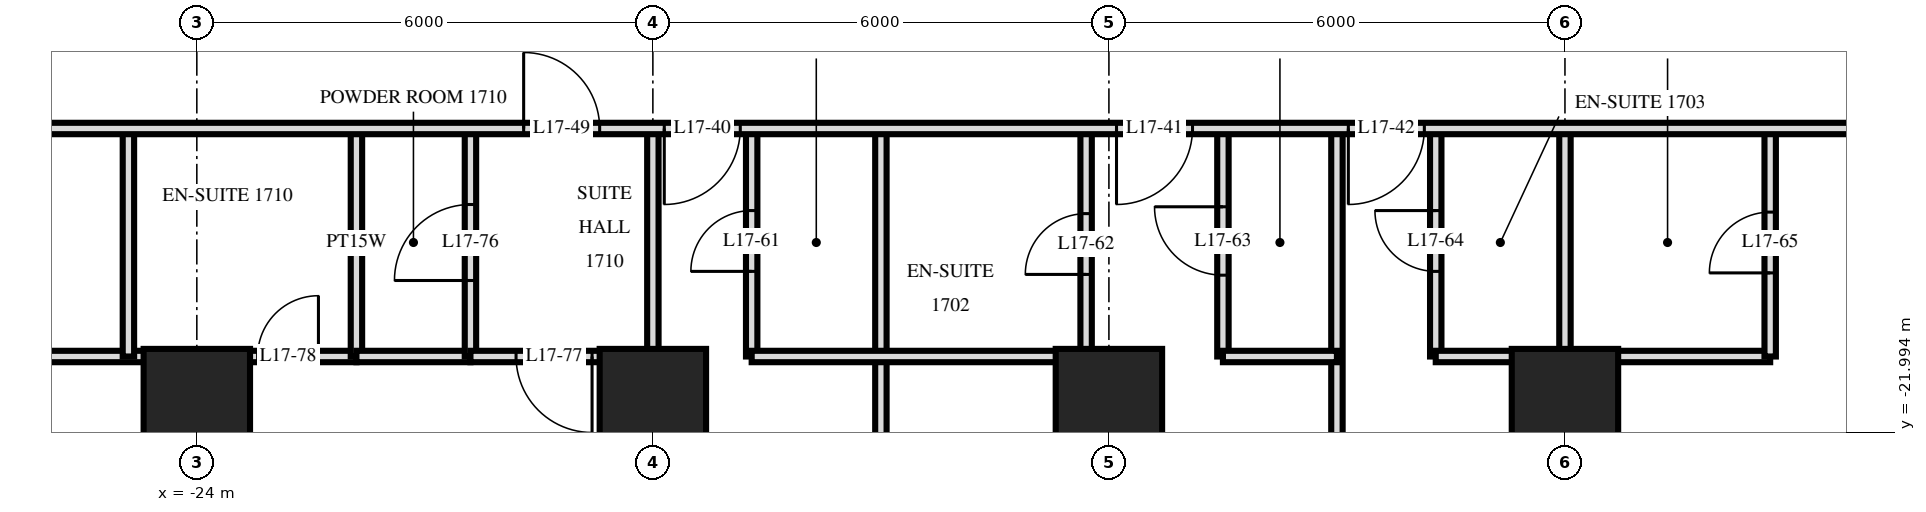
"""IFC4 building model, lengths in metres.
Left out: names, types, materials, properties, quantities, classifications, styles, units other than length and angle.
Written with IfcOpenShell. Run it as: python <this file> out.ifc"""

import sys

from ifc_helpers import new_model, si_unit, direction, frame, frame_2d, origin, origin_2d, place, context, subcontext, project, spatial, rectangle, extrude, element, fill, save


model = new_model("IFC4")
c1 = context("Model", 3, precision=1e-05, world=origin(), true_north=direction((0.0, 1.0)))
c2 = subcontext(c1, "Body", "Model", "MODEL_VIEW")
j1 = project(units=[si_unit("LENGTHUNIT", "METRE"), si_unit("PLANEANGLEUNIT", "RADIAN")], contexts=[c1])
p1 = place(None, origin())
s1 = spatial("IfcSite", under=j1, at=p1, CompositionType="ELEMENT")
p2 = place(p1, origin())
s2 = spatial("IfcBuilding", under=s1, at=p2, CompositionType="ELEMENT")
p3 = place(p2, frame((0.0, 0.0, 70.8)))
s3 = spatial("IfcBuildingStorey", under=s2, at=p3, CompositionType="ELEMENT", Elevation=70.8)
for number, where, z_axis, x_axis in (
    (1, (-24.0, -21.6, 0.0), (0.0, 0.0, 1.0), (1.0, 0.0, 0.0)),
    (2, (-18.0, -21.6, 0.0), (0.0, 0.0, 1.0), (1.0, 0.0, 0.0)),
    (3, (-12.0, -21.6, 0.0), (0.0, 0.0, 1.0), (1.0, 0.0, 0.0)),
    (4, (-6.0, -21.6, 0.0), (0.0, 0.0, 1.0), (1.0, 0.0, 0.0)),
):
    element("IfcColumn", number, at=place(p3, frame(where, z_axis=z_axis, x_axis=x_axis)), inside=s3, PredefinedType="COLUMN", context=c2, shape_type="SweptSolid", body=[
        extrude(rectangle(XDim=1.4, YDim=1.4, at=origin_2d()), origin(), (0.0, 0.0, 1.0), 3.6),
    ])
p4 = place(p3, frame((-3.3, -21.0, 0.0), z_axis=(0.0, 0.0, 1.0), x_axis=(0.0, 1.0, 0.0)))
e5 = element("IfcWall", 5, at=p4, inside=s3, PredefinedType="PARTITIONING", context=c2, shape_type="SweptSolid", body=[
    extrude(rectangle(XDim=3.0, YDim=0.15, at=frame_2d((1.5, 0.0))), origin(), (0.0, 0.0, 1.0), 3.32),
])
p5 = place(p4, frame((1.1, 0.0, 0.0)))
e6 = element("IfcOpeningElement", 6, at=p5, cuts=e5, PredefinedType="OPENING", context=c2, shape_type="SweptSolid", body=[
    extrude(rectangle(XDim=0.8, YDim=2.1, at=frame_2d((0.4, 1.05))), frame((0.0, 0.085, 0.0), z_axis=(0.0, -1.0, 0.0), x_axis=(1.0, 0.0, 0.0)), (0.0, 0.0, 1.0), 0.17),
])
p6 = place(p3, frame((-6.0, -29.22, 0.0), z_axis=(0.0, 0.0, 1.0), x_axis=(0.0, 1.0, 0.0)))
e7 = element("IfcWall", 7, at=p6, inside=s3, PredefinedType="PARTITIONING", context=c2, shape_type="SweptSolid", body=[
    extrude(rectangle(XDim=11.22, YDim=0.15, at=frame_2d((5.61, 0.0))), origin(), (0.0, 0.0, 1.0), 3.32),
])
p7 = place(p3, frame((-7.7, -21.0, 0.0), z_axis=(0.0, 0.0, 1.0), x_axis=(0.0, 1.0, 0.0)))
e8 = element("IfcWall", 8, at=p7, inside=s3, PredefinedType="PARTITIONING", context=c2, shape_type="SweptSolid", body=[
    extrude(rectangle(XDim=3.0, YDim=0.15, at=frame_2d((1.5, 0.0))), origin(), (0.0, 0.0, 1.0), 3.32),
])
p8 = place(p7, frame((1.12, 0.0, 0.0)))
e9 = element("IfcOpeningElement", 9, at=p8, cuts=e8, PredefinedType="OPENING", context=c2, shape_type="SweptSolid", body=[
    extrude(rectangle(XDim=0.8, YDim=2.1, at=frame_2d((0.4, 1.05))), frame((0.0, 0.085, 0.0), z_axis=(0.0, -1.0, 0.0), x_axis=(1.0, 0.0, 0.0)), (0.0, 0.0, 1.0), 0.17),
])
p9 = place(p3, frame((-9.0, -29.22, 0.0), z_axis=(0.0, 0.0, 1.0), x_axis=(0.0, 1.0, 0.0)))
e10 = element("IfcWall", 10, at=p9, inside=s3, PredefinedType="PARTITIONING", context=c2, shape_type="SweptSolid", body=[
    extrude(rectangle(XDim=11.22, YDim=0.15, at=frame_2d((5.61, 0.0))), origin(), (0.0, 0.0, 1.0), 3.32),
])
p10 = place(p3, frame((-10.5, -21.0, 0.0), z_axis=(0.0, 0.0, 1.0), x_axis=(0.0, 1.0, 0.0)))
e11 = element("IfcWall", 11, at=p10, inside=s3, PredefinedType="PARTITIONING", context=c2, shape_type="SweptSolid", body=[
    extrude(rectangle(XDim=3.0, YDim=0.15, at=frame_2d((1.5, 0.0))), origin(), (0.0, 0.0, 1.0), 3.32),
])
p11 = place(p10, frame((1.07, 0.0, 0.0)))
e12 = element("IfcOpeningElement", 12, at=p11, cuts=e11, PredefinedType="OPENING", context=c2, shape_type="SweptSolid", body=[
    extrude(rectangle(XDim=0.9, YDim=2.1, at=frame_2d((0.45, 1.05))), frame((0.0, 0.085, 0.0), z_axis=(0.0, -1.0, 0.0), x_axis=(1.0, 0.0, 0.0)), (0.0, 0.0, 1.0), 0.17),
])
p12 = place(p3, frame((-12.3, -21.0, 0.0), z_axis=(0.0, 0.0, 1.0), x_axis=(0.0, 1.0, 0.0)))
e13 = element("IfcWall", 13, at=p12, inside=s3, PredefinedType="PARTITIONING", context=c2, shape_type="SweptSolid", body=[
    extrude(rectangle(XDim=3.0, YDim=0.15, at=frame_2d((1.5, 0.0))), origin(), (0.0, 0.0, 1.0), 3.32),
])
p13 = place(p12, frame((1.08, 0.0, 0.0)))
e14 = element("IfcOpeningElement", 14, at=p13, cuts=e13, PredefinedType="OPENING", context=c2, shape_type="SweptSolid", body=[
    extrude(rectangle(XDim=0.8, YDim=2.1, at=frame_2d((0.4, 1.05))), frame((0.0, 0.085, 0.0), z_axis=(0.0, -1.0, 0.0), x_axis=(1.0, 0.0, 0.0)), (0.0, 0.0, 1.0), 0.17),
])
p14 = place(p3, frame((-15.0, -29.22, 0.0), z_axis=(0.0, 0.0, 1.0), x_axis=(0.0, 1.0, 0.0)))
e15 = element("IfcWall", 15, at=p14, inside=s3, PredefinedType="PARTITIONING", context=c2, shape_type="SweptSolid", body=[
    extrude(rectangle(XDim=11.22, YDim=0.15, at=frame_2d((5.61, 0.0))), origin(), (0.0, 0.0, 1.0), 3.32),
])
p15 = place(p3, frame((-16.7, -21.0, 0.0), z_axis=(0.0, 0.0, 1.0), x_axis=(0.0, 1.0, 0.0)))
e16 = element("IfcWall", 16, at=p15, inside=s3, PredefinedType="PARTITIONING", context=c2, shape_type="SweptSolid", body=[
    extrude(rectangle(XDim=3.0, YDim=0.15, at=frame_2d((1.5, 0.0))), origin(), (0.0, 0.0, 1.0), 3.32),
])
p16 = place(p15, frame((1.12, 0.0, 0.0)))
e17 = element("IfcOpeningElement", 17, at=p16, cuts=e16, PredefinedType="OPENING", context=c2, shape_type="SweptSolid", body=[
    extrude(rectangle(XDim=0.8, YDim=2.1, at=frame_2d((0.4, 1.05))), frame((0.0, 0.085, 0.0), z_axis=(0.0, -1.0, 0.0), x_axis=(1.0, 0.0, 0.0)), (0.0, 0.0, 1.0), 0.17),
])
p17 = place(p3, frame((-18.0, -21.0, 0.0), z_axis=(0.0, 0.0, 1.0), x_axis=(0.0, 1.0, 0.0)))
e18 = element("IfcWall", 18, at=p17, inside=s3, PredefinedType="PARTITIONING", context=c2, shape_type="SweptSolid", body=[
    extrude(rectangle(XDim=3.0, YDim=0.15, at=frame_2d((1.5, 0.0))), origin(), (0.0, 0.0, 1.0), 3.32),
])
p18 = place(p3, frame((-18.0, -29.22, 0.0), z_axis=(0.0, 0.0, 1.0), x_axis=(0.0, 1.0, 0.0)))
e19 = element("IfcWall", 19, at=p18, inside=s3, PredefinedType="PARTITIONING", context=c2, shape_type="SweptSolid", body=[
    extrude(rectangle(XDim=8.22, YDim=0.15, at=frame_2d((4.11, 0.0))), origin(), (0.0, 0.0, 1.0), 3.32),
])
p19 = place(p3, frame((-20.4, -21.0, 0.0), z_axis=(0.0, 0.0, 1.0), x_axis=(0.0, 1.0, 0.0)))
e20 = element("IfcWall", 20, at=p19, inside=s3, PredefinedType="PARTITIONING", context=c2, shape_type="SweptSolid", body=[
    extrude(rectangle(XDim=3.0, YDim=0.15, at=frame_2d((1.5, 0.0))), origin(), (0.0, 0.0, 1.0), 3.32),
])
p20 = place(p19, frame((1.0, 0.0, 0.0)))
e21 = element("IfcOpeningElement", 21, at=p20, cuts=e20, PredefinedType="OPENING", context=c2, shape_type="SweptSolid", body=[
    extrude(rectangle(XDim=1.0, YDim=2.1, at=frame_2d((0.5, 1.05))), frame((0.0, 0.085, 0.0), z_axis=(0.0, -1.0, 0.0), x_axis=(1.0, 0.0, 0.0)), (0.0, 0.0, 1.0), 0.17),
])
p21 = place(p3, frame((-21.9, -21.0, 0.0), z_axis=(0.0, 0.0, 1.0), x_axis=(0.0, 1.0, 0.0)))
e22 = element("IfcWall", 22, at=p21, inside=s3, PredefinedType="PLUMBINGWALL", context=c2, shape_type="SweptSolid", body=[
    extrude(rectangle(XDim=3.0, YDim=0.15, at=frame_2d((1.5, 0.0))), origin(), (0.0, 0.0, 1.0), 3.32),
])
p22 = place(p3, frame((-24.0, -29.22, 0.0), z_axis=(0.0, 0.0, 1.0), x_axis=(0.0, 1.0, 0.0)))
e23 = element("IfcWall", 23, at=p22, inside=s3, PredefinedType="PARTITIONING", context=c2, shape_type="SweptSolid", body=[
    extrude(rectangle(XDim=8.22, YDim=0.15, at=frame_2d((4.11, 0.0))), origin(), (0.0, 0.0, 1.0), 3.32),
])
p23 = place(p22, frame((3.59, 0.0, 0.0)))
e24 = element("IfcOpeningElement", 24, at=p23, cuts=e23, PredefinedType="OPENING", context=c2, shape_type="SweptSolid", body=[
    extrude(rectangle(XDim=0.9, YDim=2.1, at=frame_2d((0.45, 1.05))), frame((0.0, 0.085, 0.0), z_axis=(0.0, -1.0, 0.0), x_axis=(1.0, 0.0, 0.0)), (0.0, 0.0, 1.0), 0.17),
])
p24 = place(p3, frame((-24.9, -21.0, 0.0), z_axis=(0.0, 0.0, 1.0), x_axis=(0.0, 1.0, 0.0)))
e25 = element("IfcWall", 25, at=p24, inside=s3, PredefinedType="PARTITIONING", context=c2, shape_type="SweptSolid", body=[
    extrude(rectangle(XDim=3.0, YDim=0.15, at=frame_2d((1.5, 0.0))), origin(), (0.0, 0.0, 1.0), 3.32),
])
p25 = place(p3, frame((-20.4, -21.0, 0.0), z_axis=(0.0, 0.0, 1.0), x_axis=(1.0, 0.0, 0.0)))
e26 = element("IfcWall", 26, at=p25, inside=s3, PredefinedType="PARTITIONING", context=c2, shape_type="SweptSolid", body=[
    extrude(rectangle(XDim=2.4, YDim=0.15, at=frame_2d((1.2, 0.0))), origin(), (0.0, 0.0, 1.0), 3.32),
])
p26 = place(p25, frame((0.6, 0.0, 0.0)))
e27 = element("IfcOpeningElement", 27, at=p26, cuts=e26, PredefinedType="OPENING", context=c2, shape_type="SweptSolid", body=[
    extrude(rectangle(XDim=1.0, YDim=2.1, at=frame_2d((0.5, 1.05))), frame((0.0, 0.085, 0.0), z_axis=(0.0, -1.0, 0.0), x_axis=(1.0, 0.0, 0.0)), (0.0, 0.0, 1.0), 0.17),
])
p27 = place(p3, frame((-33.12, -21.0, 0.0), z_axis=(0.0, 0.0, 1.0), x_axis=(1.0, 0.0, 0.0)))
e28 = element("IfcWall", 28, at=p27, inside=s3, PredefinedType="PARTITIONING", context=c2, shape_type="SweptSolid", body=[
    extrude(rectangle(XDim=11.22, YDim=0.15, at=frame_2d((5.61, 0.0))), origin(), (0.0, 0.0, 1.0), 3.32),
])
p28 = place(p27, frame((9.92, 0.0, 0.0)))
e29 = element("IfcOpeningElement", 29, at=p28, cuts=e28, PredefinedType="OPENING", context=c2, shape_type="SweptSolid", body=[
    extrude(rectangle(XDim=0.8, YDim=2.1, at=frame_2d((0.4, 1.05))), frame((0.0, 0.085, 0.0), z_axis=(0.0, -1.0, 0.0), x_axis=(1.0, 0.0, 0.0)), (0.0, 0.0, 1.0), 0.17),
])
p29 = place(p27, frame((3.92, 0.0, 0.0)))
e30 = element("IfcOpeningElement", 30, at=p29, cuts=e28, PredefinedType="OPENING", context=c2, shape_type="SweptSolid", body=[
    extrude(rectangle(XDim=0.9, YDim=2.1, at=frame_2d((0.45, 1.05))), frame((0.0, 0.085, 0.0), z_axis=(0.0, -1.0, 0.0), x_axis=(1.0, 0.0, 0.0)), (0.0, 0.0, 1.0), 0.17),
])
p30 = place(p3, frame((-16.7, -21.0, 0.0), z_axis=(0.0, 0.0, 1.0), x_axis=(1.0, 0.0, 0.0)))
e31 = element("IfcWall", 31, at=p30, inside=s3, PredefinedType="PARTITIONING", context=c2, shape_type="SweptSolid", body=[
    extrude(rectangle(XDim=4.4, YDim=0.15, at=frame_2d((2.2, 0.0))), origin(), (0.0, 0.0, 1.0), 3.32),
])
p31 = place(p3, frame((-10.5, -21.0, 0.0), z_axis=(0.0, 0.0, 1.0), x_axis=(1.0, 0.0, 0.0)))
e32 = element("IfcWall", 32, at=p31, inside=s3, PredefinedType="PARTITIONING", context=c2, shape_type="SweptSolid", body=[
    extrude(rectangle(XDim=1.5, YDim=0.15, at=frame_2d((0.75, 0.0))), origin(), (0.0, 0.0, 1.0), 3.32),
])
p32 = place(p3, frame((-7.7, -21.0, 0.0), z_axis=(0.0, 0.0, 1.0), x_axis=(1.0, 0.0, 0.0)))
e33 = element("IfcWall", 33, at=p32, inside=s3, PredefinedType="PARTITIONING", context=c2, shape_type="SweptSolid", body=[
    extrude(rectangle(XDim=4.4, YDim=0.15, at=frame_2d((2.2, 0.0))), origin(), (0.0, 0.0, 1.0), 3.32),
])
p33 = place(p3, frame((-21.9, -21.0, 0.0), z_axis=(0.0, 0.0, 1.0), x_axis=(1.0, 0.0, 0.0)))
e34 = element("IfcWall", 34, at=p33, inside=s3, PredefinedType="PLUMBINGWALL", context=c2, shape_type="SweptSolid", body=[
    extrude(rectangle(XDim=1.5, YDim=0.15, at=frame_2d((0.75, 0.0))), origin(), (0.0, 0.0, 1.0), 3.32),
])
p34 = place(p3, frame((-33.12, -18.0, 0.0), z_axis=(0.0, 0.0, 1.0), x_axis=(1.0, 0.0, 0.0)))
e35 = element("IfcWall", 35, at=p34, inside=s3, PredefinedType="PARTITIONING", context=c2, shape_type="SweptSolid", body=[
    extrude(rectangle(XDim=66.24, YDim=0.15, at=frame_2d((33.12, 0.0))), origin(), (0.0, 0.0, 1.0), 3.32),
])
p35 = place(p34, frame((15.27, 0.0, 0.0)))
e36 = element("IfcOpeningElement", 36, at=p35, cuts=e35, PredefinedType="OPENING", context=c2, shape_type="SweptSolid", body=[
    extrude(rectangle(XDim=1.0, YDim=2.1, at=frame_2d((0.5, 1.05))), frame((0.0, 0.085, 0.0), z_axis=(0.0, -1.0, 0.0), x_axis=(1.0, 0.0, 0.0)), (0.0, 0.0, 1.0), 0.17),
])
p36 = place(p34, frame((21.22, 0.0, 0.0)))
e37 = element("IfcOpeningElement", 37, at=p36, cuts=e35, PredefinedType="OPENING", context=c2, shape_type="SweptSolid", body=[
    extrude(rectangle(XDim=1.0, YDim=2.1, at=frame_2d((0.5, 1.05))), frame((0.0, 0.085, 0.0), z_axis=(0.0, -1.0, 0.0), x_axis=(1.0, 0.0, 0.0)), (0.0, 0.0, 1.0), 0.17),
])
p37 = place(p34, frame((24.27, 0.0, 0.0)))
e38 = element("IfcOpeningElement", 38, at=p37, cuts=e35, PredefinedType="OPENING", context=c2, shape_type="SweptSolid", body=[
    extrude(rectangle(XDim=1.0, YDim=2.1, at=frame_2d((0.5, 1.05))), frame((0.0, 0.085, 0.0), z_axis=(0.0, -1.0, 0.0), x_axis=(1.0, 0.0, 0.0)), (0.0, 0.0, 1.0), 0.17),
])
p38 = place(p34, frame((30.97, 0.0, 0.0)))
e39 = element("IfcOpeningElement", 39, at=p38, cuts=e35, PredefinedType="OPENING", context=c2, shape_type="SweptSolid", body=[
    extrude(rectangle(XDim=1.0, YDim=2.1, at=frame_2d((0.5, 1.05))), frame((0.0, 0.085, 0.0), z_axis=(0.0, -1.0, 0.0), x_axis=(1.0, 0.0, 0.0)), (0.0, 0.0, 1.0), 0.17),
])
p39 = place(p34, frame((40.42, 0.0, 0.0)))
e40 = element("IfcOpeningElement", 40, at=p39, cuts=e35, PredefinedType="OPENING", context=c2, shape_type="SweptSolid", body=[
    extrude(rectangle(XDim=1.0, YDim=2.1, at=frame_2d((0.5, 1.05))), frame((0.0, 0.085, 0.0), z_axis=(0.0, -1.0, 0.0), x_axis=(1.0, 0.0, 0.0)), (0.0, 0.0, 1.0), 0.17),
])
p40 = place(p34, frame((43.97, 0.0, 0.0)))
e41 = element("IfcOpeningElement", 41, at=p40, cuts=e35, PredefinedType="OPENING", context=c2, shape_type="SweptSolid", body=[
    extrude(rectangle(XDim=1.0, YDim=2.1, at=frame_2d((0.5, 1.05))), frame((0.0, 0.085, 0.0), z_axis=(0.0, -1.0, 0.0), x_axis=(1.0, 0.0, 0.0)), (0.0, 0.0, 1.0), 0.17),
])
p41 = place(p34, frame((45.52, 0.0, 0.0)))
e42 = element("IfcOpeningElement", 42, at=p41, cuts=e35, PredefinedType="OPENING", context=c2, shape_type="SweptSolid", body=[
    extrude(rectangle(XDim=1.0, YDim=2.1, at=frame_2d((0.5, 1.05))), frame((0.0, 0.085, 0.0), z_axis=(0.0, -1.0, 0.0), x_axis=(1.0, 0.0, 0.0)), (0.0, 0.0, 1.0), 0.17),
])
p42 = place(p34, frame((52.97, 0.0, 0.0)))
e43 = element("IfcOpeningElement", 43, at=p42, cuts=e35, PredefinedType="OPENING", context=c2, shape_type="SweptSolid", body=[
    extrude(rectangle(XDim=1.0, YDim=2.1, at=frame_2d((0.5, 1.05))), frame((0.0, 0.085, 0.0), z_axis=(0.0, -1.0, 0.0), x_axis=(1.0, 0.0, 0.0)), (0.0, 0.0, 1.0), 0.17),
])
p43 = place(p34, frame((54.27, 0.0, 0.0)))
e44 = element("IfcOpeningElement", 44, at=p43, cuts=e35, PredefinedType="OPENING", context=c2, shape_type="SweptSolid", body=[
    extrude(rectangle(XDim=1.0, YDim=2.1, at=frame_2d((0.5, 1.05))), frame((0.0, 0.085, 0.0), z_axis=(0.0, -1.0, 0.0), x_axis=(1.0, 0.0, 0.0)), (0.0, 0.0, 1.0), 0.17),
])
p44 = place(p34, frame((13.42, 0.0, 0.0)))
e45 = element("IfcOpeningElement", 45, at=p44, cuts=e35, PredefinedType="OPENING", context=c2, shape_type="SweptSolid", body=[
    extrude(rectangle(XDim=1.0, YDim=2.1, at=frame_2d((0.5, 1.05))), frame((0.0, 0.085, 0.0), z_axis=(0.0, -1.0, 0.0), x_axis=(1.0, 0.0, 0.0)), (0.0, 0.0, 1.0), 0.17),
])
p45 = place(p34, frame((60.82, 0.0, 0.0)))
e46 = element("IfcOpeningElement", 46, at=p45, cuts=e35, PredefinedType="OPENING", context=c2, shape_type="SweptSolid", body=[
    extrude(rectangle(XDim=1.0, YDim=2.1, at=frame_2d((0.5, 1.05))), frame((0.0, 0.085, 0.0), z_axis=(0.0, -1.0, 0.0), x_axis=(1.0, 0.0, 0.0)), (0.0, 0.0, 1.0), 0.17),
])
p46 = place(p35, frame((0.5, 0.0, 0.0), z_axis=(0.0, 0.0, 1.0), x_axis=(-1.0, 0.0, 0.0)))
e47 = element("IfcDoor", 47, at=p46, inside=s3, OperationType="SINGLE_SWING_LEFT", PredefinedType="DOOR", context=c2, shape_type="SweptSolid", body=[
    extrude(rectangle(XDim=1.0, YDim=2.1, at=frame_2d((0.0, 1.05))), frame((0.0, -0.025, 0.0), z_axis=(0.0, 1.0, 0.0), x_axis=(-1.0, 0.0, 0.0)), (0.0, 0.0, 1.0), 0.05),
])
fill(e36, e47)
p47 = place(p36, frame((0.5, 0.0, 0.0), z_axis=(0.0, 0.0, 1.0), x_axis=(-1.0, 0.0, 0.0)))
e48 = element("IfcDoor", 48, at=p47, inside=s3, OperationType="SINGLE_SWING_LEFT", PredefinedType="DOOR", context=c2, shape_type="SweptSolid", body=[
    extrude(rectangle(XDim=1.0, YDim=2.1, at=frame_2d((0.0, 1.05))), frame((0.0, -0.025, 0.0), z_axis=(0.0, 1.0, 0.0), x_axis=(-1.0, 0.0, 0.0)), (0.0, 0.0, 1.0), 0.05),
])
fill(e37, e48)
p48 = place(p37, frame((0.5, 0.0, 0.0), z_axis=(0.0, 0.0, 1.0), x_axis=(-1.0, 0.0, 0.0)))
e49 = element("IfcDoor", 49, at=p48, inside=s3, OperationType="SINGLE_SWING_LEFT", PredefinedType="DOOR", context=c2, shape_type="SweptSolid", body=[
    extrude(rectangle(XDim=1.0, YDim=2.1, at=frame_2d((0.0, 1.05))), frame((0.0, -0.025, 0.0), z_axis=(0.0, 1.0, 0.0), x_axis=(-1.0, 0.0, 0.0)), (0.0, 0.0, 1.0), 0.05),
])
fill(e38, e49)
p49 = place(p44, origin())
e50 = element("IfcDoor", 50, at=p49, inside=s3, OperationType="SINGLE_SWING_RIGHT", PredefinedType="DOOR", context=c2, shape_type="SweptSolid", body=[
    extrude(rectangle(XDim=1.0, YDim=2.1, at=frame_2d((0.5, 1.05))), frame((0.0, 0.025, 0.0), z_axis=(0.0, -1.0, 0.0), x_axis=(1.0, 0.0, 0.0)), (0.0, 0.0, 1.0), 0.05),
])
fill(e45, e50)
p50 = place(p16, origin())
e51 = element("IfcDoor", 51, at=p50, inside=s3, OperationType="SINGLE_SWING_RIGHT", PredefinedType="DOOR", context=c2, shape_type="SweptSolid", body=[
    extrude(rectangle(XDim=0.8, YDim=2.1, at=frame_2d((0.4, 1.05))), frame((0.0, 0.025, 0.0), z_axis=(0.0, -1.0, 0.0), x_axis=(1.0, 0.0, 0.0)), (0.0, 0.0, 1.0), 0.05),
])
fill(e17, e51)
p51 = place(p13, origin())
e52 = element("IfcDoor", 52, at=p51, inside=s3, OperationType="SINGLE_SWING_RIGHT", PredefinedType="DOOR", context=c2, shape_type="SweptSolid", body=[
    extrude(rectangle(XDim=0.8, YDim=2.1, at=frame_2d((0.4, 1.05))), frame((0.0, 0.025, 0.0), z_axis=(0.0, -1.0, 0.0), x_axis=(1.0, 0.0, 0.0)), (0.0, 0.0, 1.0), 0.05),
])
fill(e14, e52)
p52 = place(p11, origin())
e53 = element("IfcDoor", 53, at=p52, inside=s3, OperationType="SINGLE_SWING_LEFT", PredefinedType="DOOR", context=c2, shape_type="SweptSolid", body=[
    extrude(rectangle(XDim=0.9, YDim=2.1, at=frame_2d((0.45, 1.05))), frame((0.0, 0.025, 0.0), z_axis=(0.0, -1.0, 0.0), x_axis=(1.0, 0.0, 0.0)), (0.0, 0.0, 1.0), 0.05),
])
fill(e12, e53)
p53 = place(p8, origin())
e54 = element("IfcDoor", 54, at=p53, inside=s3, OperationType="SINGLE_SWING_LEFT", PredefinedType="DOOR", context=c2, shape_type="SweptSolid", body=[
    extrude(rectangle(XDim=0.8, YDim=2.1, at=frame_2d((0.4, 1.05))), frame((0.0, 0.025, 0.0), z_axis=(0.0, -1.0, 0.0), x_axis=(1.0, 0.0, 0.0)), (0.0, 0.0, 1.0), 0.05),
])
fill(e9, e54)
p54 = place(p5, origin())
e55 = element("IfcDoor", 55, at=p54, inside=s3, OperationType="SINGLE_SWING_RIGHT", PredefinedType="DOOR", context=c2, shape_type="SweptSolid", body=[
    extrude(rectangle(XDim=0.8, YDim=2.1, at=frame_2d((0.4, 1.05))), frame((0.0, 0.025, 0.0), z_axis=(0.0, -1.0, 0.0), x_axis=(1.0, 0.0, 0.0)), (0.0, 0.0, 1.0), 0.05),
])
fill(e6, e55)
p55 = place(p20, origin())
e56 = element("IfcDoor", 56, at=p55, inside=s3, OperationType="SINGLE_SWING_RIGHT", PredefinedType="DOOR", context=c2, shape_type="SweptSolid", body=[
    extrude(rectangle(XDim=1.0, YDim=2.1, at=frame_2d((0.5, 1.05))), frame((0.0, 0.025, 0.0), z_axis=(0.0, -1.0, 0.0), x_axis=(1.0, 0.0, 0.0)), (0.0, 0.0, 1.0), 0.05),
])
fill(e21, e56)
p56 = place(p26, frame((0.5, 0.0, 0.0), z_axis=(0.0, 0.0, 1.0), x_axis=(-1.0, 0.0, 0.0)))
e57 = element("IfcDoor", 57, at=p56, inside=s3, OperationType="SINGLE_SWING_RIGHT", PredefinedType="DOOR", context=c2, shape_type="SweptSolid", body=[
    extrude(rectangle(XDim=1.0, YDim=2.1, at=frame_2d((0.0, 1.05))), frame((0.0, -0.025, 0.0), z_axis=(0.0, 1.0, 0.0), x_axis=(-1.0, 0.0, 0.0)), (0.0, 0.0, 1.0), 0.05),
])
fill(e27, e57)
p57 = place(p28, origin())
e58 = element("IfcDoor", 58, at=p57, inside=s3, OperationType="SINGLE_SWING_LEFT", PredefinedType="DOOR", context=c2, shape_type="SweptSolid", body=[
    extrude(rectangle(XDim=0.8, YDim=2.1, at=frame_2d((0.4, 1.05))), frame((0.0, 0.025, 0.0), z_axis=(0.0, -1.0, 0.0), x_axis=(1.0, 0.0, 0.0)), (0.0, 0.0, 1.0), 0.05),
])
fill(e29, e58)
save(model, sys.argv[1])
